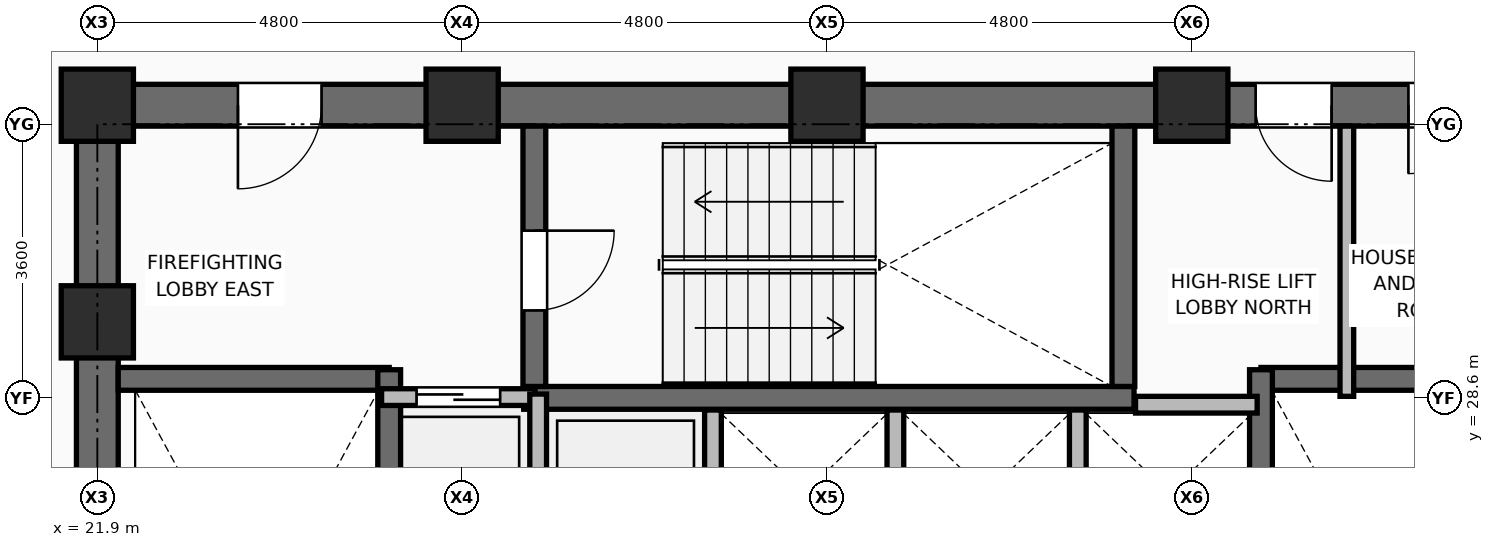
"""IFC4 building model, lengths in metres.
Left out: names, types, materials, properties, quantities, classifications, styles, units other than length and angle.
Written with IfcOpenShell. Run it as: python <this file> out.ifc"""

import sys

from ifc_helpers import new_model, si_unit, direction, frame, frame_2d, origin, origin_2d, place, context, subcontext, project, spatial, rectangle, extrude, element, fill, save


model = new_model("IFC4")
c1 = context("Model", 3, precision=1e-05, world=origin(), true_north=direction((0.0, 1.0)))
c2 = subcontext(c1, "Body", "Model", "MODEL_VIEW")
j1 = project(units=[si_unit("LENGTHUNIT", "METRE"), si_unit("PLANEANGLEUNIT", "RADIAN")], contexts=[c1])
p1 = place(None, origin())
s1 = spatial("IfcSite", under=j1, at=p1, CompositionType="ELEMENT")
p2 = place(p1, origin())
s2 = spatial("IfcBuilding", under=s1, at=p2, CompositionType="ELEMENT")
p3 = place(p2, frame((0.0, 0.0, 153.45)))
s3 = spatial("IfcBuildingStorey", under=s2, at=p3, CompositionType="ELEMENT", Elevation=153.45)
for number, where, z_axis, x_axis in (
    (1, (21.9, 29.6, 0.0), (0.0, 0.0, 1.0), (1.0, 0.0, 0.0)),
    (2, (21.9, 32.45, 0.0), (0.0, 0.0, 1.0), (1.0, 0.0, 0.0)),
    (3, (26.7, 32.45, 0.0), (0.0, 0.0, 1.0), (1.0, 0.0, 0.0)),
    (4, (31.5, 32.45, 0.0), (0.0, 0.0, 1.0), (1.0, 0.0, 0.0)),
    (5, (36.3, 32.45, 0.0), (0.0, 0.0, 1.0), (1.0, 0.0, 0.0)),
):
    element("IfcColumn", number, at=place(p3, frame(where, z_axis=z_axis, x_axis=x_axis)), inside=s3, PredefinedType="COLUMN", context=c2, shape_type="SweptSolid", body=[
        extrude(rectangle(XDim=0.95, YDim=0.95, at=origin_2d()), origin(), (0.0, 0.0, 1.0), 3.75),
    ])
p4 = place(p3, frame((30.0, 25.71, 0.0), z_axis=(0.0, 0.0, 1.0), x_axis=(0.0, 1.0, 0.0)))
e6 = element("IfcWall", 6, at=p4, inside=s3, PredefinedType="PARTITIONING", context=c2, shape_type="SweptSolid", body=[
    extrude(rectangle(XDim=2.73, YDim=0.22, at=frame_2d((1.365, 0.0))), origin(), (0.0, 0.0, 1.0), 3.545),
])
p5 = place(p3, frame((32.4, 26.2, 0.0), z_axis=(0.0, 0.0, 1.0), x_axis=(0.0, 1.0, 0.0)))
e7 = element("IfcWall", 7, at=p5, inside=s3, PredefinedType="PARTITIONING", context=c2, shape_type="SweptSolid", body=[
    extrude(rectangle(XDim=2.24, YDim=0.22, at=frame_2d((1.12, 0.0))), origin(), (0.0, 0.0, 1.0), 3.545),
])
p6 = place(p3, frame((34.8, 26.23, 0.0), z_axis=(0.0, 0.0, 1.0), x_axis=(0.0, 1.0, 0.0)))
e8 = element("IfcWall", 8, at=p6, inside=s3, PredefinedType="PARTITIONING", context=c2, shape_type="SweptSolid", body=[
    extrude(rectangle(XDim=2.21, YDim=0.22, at=frame_2d((1.105, 0.0))), origin(), (0.0, 0.0, 1.0), 3.545),
])
p7 = place(p3, frame((21.625, 32.45, 0.0), z_axis=(0.0, 0.0, 1.0), x_axis=(1.0, 0.0, 0.0)))
e9 = element("IfcWall", 9, at=p7, inside=s3, PredefinedType="SHEAR", context=c2, shape_type="SweptSolid", body=[
    extrude(rectangle(XDim=19.75, YDim=0.55, at=frame_2d((9.875, 0.0))), origin(), (0.0, 0.0, 1.0), 3.57),
])
p8 = place(p7, frame((2.125, 0.0, 0.0)))
e10 = element("IfcOpeningElement", 10, at=p8, cuts=e9, PredefinedType="OPENING", context=c2, shape_type="SweptSolid", body=[
    extrude(rectangle(XDim=1.1, YDim=2.1, at=frame_2d((0.55, 1.05))), frame((0.0, 0.285, 0.0), z_axis=(0.0, -1.0, 0.0), x_axis=(1.0, 0.0, 0.0)), (0.0, 0.0, 1.0), 0.57),
])
p9 = place(p7, frame((15.515, 0.0, 0.0)))
e11 = element("IfcOpeningElement", 11, at=p9, cuts=e9, PredefinedType="OPENING", context=c2, shape_type="SweptSolid", body=[
    extrude(rectangle(XDim=1.0, YDim=2.1, at=frame_2d((0.5, 1.05))), frame((0.0, 0.285, 0.0), z_axis=(0.0, -1.0, 0.0), x_axis=(1.0, 0.0, 0.0)), (0.0, 0.0, 1.0), 0.57),
])
p10 = place(p7, frame((17.525, 0.0, 0.0)))
e12 = element("IfcOpeningElement", 12, at=p10, cuts=e9, PredefinedType="OPENING", context=c2, shape_type="SweptSolid", body=[
    extrude(rectangle(XDim=0.9, YDim=2.1, at=frame_2d((0.45, 1.05))), frame((0.0, 0.285, 0.0), z_axis=(0.0, -1.0, 0.0), x_axis=(1.0, 0.0, 0.0)), (0.0, 0.0, 1.0), 0.57),
])
p11 = place(p3, frame((21.9, 18.075, 0.0), z_axis=(0.0, 0.0, 1.0), x_axis=(0.0, 1.0, 0.0)))
e13 = element("IfcWall", 13, at=p11, inside=s3, PredefinedType="SHEAR", context=c2, shape_type="SweptSolid", body=[
    extrude(rectangle(XDim=14.1, YDim=0.55, at=frame_2d((7.05, 0.0))), origin(), (0.0, 0.0, 1.0), 3.57),
])
p12 = place(p3, frame((22.175, 28.85, 0.0), z_axis=(0.0, 0.0, 1.0), x_axis=(1.0, 0.0, 0.0)))
e14 = element("IfcWall", 14, at=p12, inside=s3, PredefinedType="SHEAR", context=c2, shape_type="SweptSolid", body=[
    extrude(rectangle(XDim=3.565, YDim=0.3, at=frame_2d((1.782, 0.0))), origin(), (0.0, 0.0, 1.0), 3.57),
])
p13 = place(p3, frame((25.74, 20.98, 0.0), z_axis=(0.0, 0.0, 1.0), x_axis=(0.0, 1.0, 0.0)))
e15 = element("IfcWall", 15, at=p13, inside=s3, PredefinedType="SHEAR", context=c2, shape_type="SweptSolid", body=[
    extrude(rectangle(XDim=7.99, YDim=0.3, at=frame_2d((3.995, 0.0))), origin(), (0.0, 0.0, 1.0), 3.57),
])
p14 = place(p3, frame((37.21, 28.85, 0.0), z_axis=(0.0, 0.0, 1.0), x_axis=(1.0, 0.0, 0.0)))
e16 = element("IfcWall", 16, at=p14, inside=s3, PredefinedType="SHEAR", context=c2, shape_type="SweptSolid", body=[
    extrude(rectangle(XDim=3.615, YDim=0.3, at=frame_2d((1.808, 0.0))), origin(), (0.0, 0.0, 1.0), 3.57),
])
p15 = place(p3, frame((37.21, 20.98, 0.0), z_axis=(0.0, 0.0, 1.0), x_axis=(0.0, 1.0, 0.0)))
e17 = element("IfcWall", 17, at=p15, inside=s3, PredefinedType="SHEAR", context=c2, shape_type="SweptSolid", body=[
    extrude(rectangle(XDim=7.99, YDim=0.3, at=frame_2d((3.995, 0.0))), origin(), (0.0, 0.0, 1.0), 3.57),
])
p16 = place(p3, frame((27.51, 28.6, 0.0), z_axis=(0.0, 0.0, 1.0), x_axis=(1.0, 0.0, 0.0)))
e18 = element("IfcWall", 18, at=p16, inside=s3, PredefinedType="SHEAR", context=c2, shape_type="SweptSolid", body=[
    extrude(rectangle(XDim=8.03, YDim=0.3, at=frame_2d((4.015, 0.0))), origin(), (0.0, 0.0, 1.0), 3.57),
])
p17 = place(p3, frame((27.65, 28.75, 0.0), z_axis=(0.0, 0.0, 1.0), x_axis=(0.0, 1.0, 0.0)))
e19 = element("IfcWall", 19, at=p17, inside=s3, PredefinedType="SHEAR", context=c2, shape_type="SweptSolid", body=[
    extrude(rectangle(XDim=3.425, YDim=0.3, at=frame_2d((1.712, 0.0))), origin(), (0.0, 0.0, 1.0), 3.57),
])
p18 = place(p17, frame((1.0, 0.0, 0.0)))
e20 = element("IfcOpeningElement", 20, at=p18, cuts=e19, PredefinedType="OPENING", context=c2, shape_type="SweptSolid", body=[
    extrude(rectangle(XDim=1.05, YDim=2.1, at=frame_2d((0.525, 1.05))), frame((0.0, 0.16, 0.0), z_axis=(0.0, -1.0, 0.0), x_axis=(1.0, 0.0, 0.0)), (0.0, 0.0, 1.0), 0.32),
])
p19 = place(p3, frame((35.4, 28.75, 0.0), z_axis=(0.0, 0.0, 1.0), x_axis=(0.0, 1.0, 0.0)))
e21 = element("IfcWall", 21, at=p19, inside=s3, PredefinedType="SHEAR", context=c2, shape_type="SweptSolid", body=[
    extrude(rectangle(XDim=3.425, YDim=0.3, at=frame_2d((1.712, 0.0))), origin(), (0.0, 0.0, 1.0), 3.57),
])
p20 = place(p3, frame((25.64, 28.61, 0.0), z_axis=(0.0, 0.0, 1.0), x_axis=(1.0, 0.0, 0.0)))
e22 = element("IfcWall", 22, at=p20, inside=s3, PredefinedType="PARTITIONING", context=c2, shape_type="SweptSolid", body=[
    extrude(rectangle(XDim=2.02, YDim=0.22, at=frame_2d((1.01, 0.0))), origin(), (0.0, 0.0, 1.0), 3.55),
])
p21 = place(p20, frame((0.46, 0.0, 0.0)))
e23 = element("IfcOpeningElement", 23, at=p21, cuts=e22, PredefinedType="OPENING", context=c2, shape_type="SweptSolid", body=[
    extrude(rectangle(XDim=1.1, YDim=2.2, at=frame_2d((0.55, 1.1))), frame((0.0, 0.12, 0.0), z_axis=(0.0, -1.0, 0.0), x_axis=(1.0, 0.0, 0.0)), (0.0, 0.0, 1.0), 0.24),
])
p22 = place(p3, frame((35.56, 28.51, 0.0), z_axis=(0.0, 0.0, 1.0), x_axis=(1.0, 0.0, 0.0)))
e24 = element("IfcWall", 24, at=p22, inside=s3, PredefinedType="PARTITIONING", context=c2, shape_type="SweptSolid", body=[
    extrude(rectangle(XDim=1.6, YDim=0.22, at=frame_2d((0.8, 0.0))), origin(), (0.0, 0.0, 1.0), 3.55),
])
p23 = place(p3, frame((27.7, 25.65, 0.0), z_axis=(0.0, 0.0, 1.0), x_axis=(0.0, 1.0, 0.0)))
e25 = element("IfcWall", 25, at=p23, inside=s3, PredefinedType="PARTITIONING", context=c2, shape_type="SweptSolid", body=[
    extrude(rectangle(XDim=3.0, YDim=0.22, at=frame_2d((1.5, 0.0))), origin(), (0.0, 0.0, 1.0), 3.55),
])
p24 = place(p3, frame((38.34, 28.62, 0.0), z_axis=(0.0, 0.0, 1.0), x_axis=(0.0, 1.0, 0.0)))
e26 = element("IfcWall", 26, at=p24, inside=s3, PredefinedType="PARTITIONING", context=c2, shape_type="SweptSolid", body=[
    extrude(rectangle(XDim=3.555, YDim=0.18, at=frame_2d((1.777, 0.0))), origin(), (0.0, 0.0, 1.0), 3.55),
])
p25 = place(p18, frame((1.05, 0.0, 0.0), z_axis=(0.0, 0.0, 1.0), x_axis=(-1.0, 0.0, 0.0)))
e27 = element("IfcDoor", 27, at=p25, inside=s3, OperationType="SINGLE_SWING_LEFT", PredefinedType="DOOR", context=c2, shape_type="SweptSolid", body=[
    extrude(rectangle(XDim=1.05, YDim=2.1, at=frame_2d((0.525, 1.05))), frame((0.0, 0.025, 0.0), z_axis=(0.0, -1.0, 0.0), x_axis=(1.0, 0.0, 0.0)), (0.0, 0.0, 1.0), 0.05),
])
fill(e20, e27)
p26 = place(p21, origin())
e28 = element("IfcDoor", 28, at=p26, inside=s3, OperationType="DOUBLE_DOOR_SLIDING", PredefinedType="DOOR", context=c2, shape_type="SweptSolid", body=[
    extrude(rectangle(XDim=1.1, YDim=2.2, at=frame_2d((0.55, 1.1))), frame((0.0, 0.025, 0.0), z_axis=(0.0, -1.0, 0.0), x_axis=(1.0, 0.0, 0.0)), (0.0, 0.0, 1.0), 0.05),
])
fill(e23, e28)
p27 = place(p8, frame((1.1, 0.0, 0.0), z_axis=(0.0, 0.0, 1.0), x_axis=(-1.0, 0.0, 0.0)))
e29 = element("IfcDoor", 29, at=p27, inside=s3, OperationType="SINGLE_SWING_RIGHT", PredefinedType="DOOR", context=c2, shape_type="SweptSolid", body=[
    extrude(rectangle(XDim=1.1, YDim=2.1, at=frame_2d((0.55, 1.05))), frame((0.0, 0.025, 0.0), z_axis=(0.0, -1.0, 0.0), x_axis=(1.0, 0.0, 0.0)), (0.0, 0.0, 1.0), 0.05),
])
fill(e10, e29)
p28 = place(p9, frame((1.0, 0.0, 0.0), z_axis=(0.0, 0.0, 1.0), x_axis=(-1.0, 0.0, 0.0)))
e30 = element("IfcDoor", 30, at=p28, inside=s3, OperationType="SINGLE_SWING_LEFT", PredefinedType="DOOR", context=c2, shape_type="SweptSolid", body=[
    extrude(rectangle(XDim=1.0, YDim=2.1, at=frame_2d((0.5, 1.05))), frame((0.0, 0.025, 0.0), z_axis=(0.0, -1.0, 0.0), x_axis=(1.0, 0.0, 0.0)), (0.0, 0.0, 1.0), 0.05),
])
fill(e11, e30)
p29 = place(p10, frame((0.9, 0.0, 0.0), z_axis=(0.0, 0.0, 1.0), x_axis=(-1.0, 0.0, 0.0)))
e31 = element("IfcDoor", 31, at=p29, inside=s3, OperationType="SINGLE_SWING_RIGHT", PredefinedType="DOOR", context=c2, shape_type="SweptSolid", body=[
    extrude(rectangle(XDim=0.9, YDim=2.1, at=frame_2d((0.45, 1.05))), frame((0.0, 0.025, 0.0), z_axis=(0.0, -1.0, 0.0), x_axis=(1.0, 0.0, 0.0)), (0.0, 0.0, 1.0), 0.05),
])
fill(e12, e31)
save(model, sys.argv[1])
